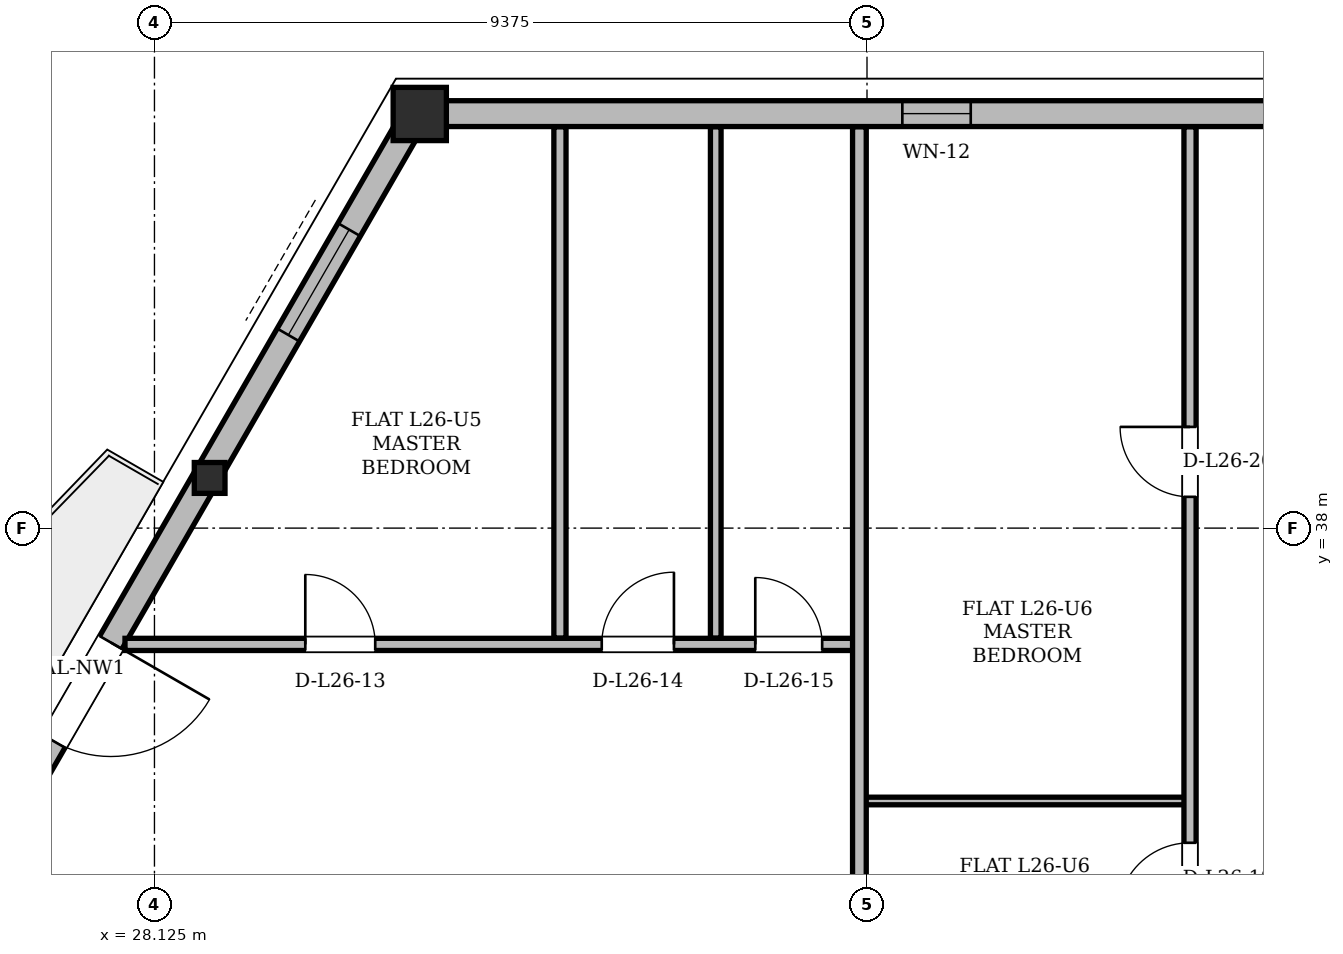
"""IFC4 building model, lengths in metres.
Left out: names, types, materials, properties, quantities, classifications, styles, units other than length and angle.
Written with IfcOpenShell. Run it as: python <this file> out.ifc"""

import sys

from ifc_helpers import new_model, si_unit, direction, frame, frame_2d, origin, origin_2d, place, context, subcontext, project, spatial, rectangle, hollow_rectangle, i_section, extrude, element, fill, save


model = new_model("IFC4")
c1 = context("Model", 3, precision=1e-05, world=origin(), true_north=direction((0.0, 1.0)))
c2 = subcontext(c1, "Body", "Model", "MODEL_VIEW")
j1 = project(units=[si_unit("LENGTHUNIT", "METRE"), si_unit("PLANEANGLEUNIT", "RADIAN")], contexts=[c1])
p1 = place(None, origin())
s1 = spatial("IfcSite", under=j1, at=p1, CompositionType="ELEMENT")
p2 = place(p1, origin())
s2 = spatial("IfcBuilding", under=s1, at=p2, CompositionType="ELEMENT")
p3 = place(p2, frame((0.0, 0.0, 100.5)))
s3 = spatial("IfcBuildingStorey", under=s2, at=p3, CompositionType="ELEMENT", Elevation=100.5)
p4 = place(p3, frame((31.568, 43.453, 0.004), z_axis=(0.026437061593, -0.002582540721, 0.999647143875), x_axis=(0.097223592457, 0.995262564889, 0.0)))
e1 = element("IfcColumn", 1, at=p4, inside=s3, PredefinedType="COLUMN", context=c2, shape_type="SweptSolid", body=[
    extrude(hollow_rectangle(XDim=0.7, YDim=0.7, WallThickness=0.055, at=origin_2d()), origin(), (0.0, 0.0, 1.0), 3.592),
])
p5 = place(p3, frame((28.807, 38.67, 0.004), z_axis=(0.024670863801, -0.005640996406, 0.999679712527), x_axis=(0.222897720207, 0.97484183657, 0.0)))
e2 = element("IfcColumn", 2, at=p5, inside=s3, PredefinedType="COLUMN", context=c2, shape_type="SweptSolid", body=[
    extrude(i_section(OverallWidth=0.404, OverallDepth=0.406, WebThickness=0.027, FlangeThickness=0.044, at=origin_2d()), origin(), (0.0, 0.0, 1.0), 3.592),
])
p6 = place(p3, frame((43.432, 43.453, 0.0), z_axis=(0.0, 0.0, 1.0), x_axis=(-1.0, 0.0, 0.0)))
e3 = element("IfcWall", 3, at=p6, inside=s3, PredefinedType="SOLIDWALL", context=c2, shape_type="SweptSolid", body=[
    extrude(rectangle(XDim=11.864, YDim=0.34, at=frame_2d((5.932, 0.0))), origin(), (0.0, 0.0, 1.0), 2.578),
])
p7 = place(p6, frame((4.567, 0.0, 0.85)))
e4 = element("IfcOpeningElement", 4, at=p7, cuts=e3, PredefinedType="OPENING", context=c2, shape_type="SweptSolid", body=[
    extrude(rectangle(XDim=0.9, YDim=1.15, at=frame_2d((0.45, 0.575))), frame((0.0, 0.17, 0.0), z_axis=(0.0, -1.0, 0.0), x_axis=(1.0, 0.0, 0.0)), (0.0, 0.0, 1.0), 0.34),
])
p8 = place(p3, frame((31.568, 43.453, 0.0), z_axis=(0.0, 0.0, 1.0), x_axis=(-0.500002056916, -0.86602421622, 0.0)))
e5 = element("IfcWall", 5, at=p8, inside=s3, PredefinedType="SOLIDWALL", context=c2, shape_type="SweptSolid", body=[
    extrude(rectangle(XDim=34.516, YDim=0.34, at=frame_2d((17.258, 0.0))), origin(), (0.0, 0.0, 1.0), 2.578),
])
p9 = place(p8, frame((8.034, 0.0, 0.0)))
e6 = element("IfcOpeningElement", 6, at=p9, cuts=e5, PredefinedType="OPENING", context=c2, shape_type="SweptSolid", body=[
    extrude(rectangle(XDim=1.5, YDim=2.2, at=frame_2d((0.75, 1.1))), frame((0.0, 0.17, 0.0), z_axis=(0.0, -1.0, 0.0), x_axis=(1.0, 0.0, 0.0)), (0.0, 0.0, 1.0), 0.34),
])
p10 = place(p8, frame((26.647, 0.0, 0.0)))
e7 = element("IfcOpeningElement", 7, at=p10, cuts=e5, PredefinedType="OPENING", context=c2, shape_type="SweptSolid", body=[
    extrude(rectangle(XDim=1.5, YDim=2.2, at=frame_2d((0.75, 1.1))), frame((0.0, 0.17, 0.0), z_axis=(0.0, -1.0, 0.0), x_axis=(1.0, 0.0, 0.0)), (0.0, 0.0, 1.0), 0.34),
])
p11 = place(p8, frame((31.672, 0.0, 0.85)))
e8 = element("IfcOpeningElement", 8, at=p11, cuts=e5, PredefinedType="OPENING", context=c2, shape_type="SweptSolid", body=[
    extrude(rectangle(XDim=1.6, YDim=1.618, at=frame_2d((0.8, 0.809))), frame((0.0, 0.17, 0.0), z_axis=(0.0, -1.0, 0.0), x_axis=(1.0, 0.0, 0.0)), (0.0, 0.0, 1.0), 0.34),
])
p12 = place(p8, frame((11.262, 0.0, 0.85)))
e9 = element("IfcOpeningElement", 9, at=p12, cuts=e5, PredefinedType="OPENING", context=c2, shape_type="SweptSolid", body=[
    extrude(rectangle(XDim=1.8, YDim=1.618, at=frame_2d((0.9, 0.809))), frame((0.0, 0.17, 0.0), z_axis=(0.0, -1.0, 0.0), x_axis=(1.0, 0.0, 0.0)), (0.0, 0.0, 1.0), 0.34),
])
p13 = place(p8, frame((18.602, 0.0, 0.85)))
e10 = element("IfcOpeningElement", 10, at=p13, cuts=e5, PredefinedType="OPENING", context=c2, shape_type="SweptSolid", body=[
    extrude(rectangle(XDim=1.2, YDim=1.48, at=frame_2d((0.6, 0.74))), frame((0.0, 0.17, 0.0), z_axis=(0.0, -1.0, 0.0), x_axis=(1.0, 0.0, 0.0)), (0.0, 0.0, 1.0), 0.34),
])
p14 = place(p8, frame((1.763, 0.0, 0.85)))
e11 = element("IfcOpeningElement", 11, at=p14, cuts=e5, PredefinedType="OPENING", context=c2, shape_type="SweptSolid", body=[
    extrude(rectangle(XDim=1.6, YDim=1.618, at=frame_2d((0.8, 0.809))), frame((0.0, 0.17, 0.0), z_axis=(0.0, -1.0, 0.0), x_axis=(1.0, 0.0, 0.0)), (0.0, 0.0, 1.0), 0.34),
])
p15 = place(p3, frame((37.35, 34.41, 0.0), z_axis=(0.0, 0.0, 1.0), x_axis=(1.0, 0.0, 0.0)))
e12 = element("IfcWall", 12, at=p15, inside=s3, PredefinedType="PARTITIONING", context=c2, shape_type="SweptSolid", body=[
    extrude(rectangle(XDim=4.4, YDim=0.1, at=frame_2d((2.2, 0.0))), origin(), (0.0, 0.0, 1.0), 3.36),
])
p16 = place(p3, frame((27.737, 36.47, 0.0), z_axis=(0.0, 0.0, 1.0), x_axis=(1.0, 0.0, 0.0)))
e13 = element("IfcWall", 13, at=p16, inside=s3, PredefinedType="PARTITIONING", context=c2, shape_type="SweptSolid", body=[
    extrude(rectangle(XDim=9.713, YDim=0.16, at=frame_2d((4.856, 0.0))), origin(), (0.0, 0.0, 1.0), 2.814),
])
p17 = place(p16, frame((2.372, 0.0, 0.0)))
e14 = element("IfcOpeningElement", 14, at=p17, cuts=e13, PredefinedType="OPENING", context=c2, shape_type="SweptSolid", body=[
    extrude(rectangle(XDim=0.92, YDim=2.12, at=frame_2d((0.46, 1.06))), frame((0.0, 0.08, 0.0), z_axis=(0.0, -1.0, 0.0), x_axis=(1.0, 0.0, 0.0)), (0.0, 0.0, 1.0), 0.16),
])
p18 = place(p16, frame((6.273, 0.0, 0.0)))
e15 = element("IfcOpeningElement", 15, at=p18, cuts=e13, PredefinedType="OPENING", context=c2, shape_type="SweptSolid", body=[
    extrude(rectangle(XDim=0.95, YDim=2.1, at=frame_2d((0.475, 1.05))), frame((0.0, 0.08, 0.0), z_axis=(0.0, -1.0, 0.0), x_axis=(1.0, 0.0, 0.0)), (0.0, 0.0, 1.0), 0.16),
])
p19 = place(p16, frame((8.292, 0.0, 0.0)))
e16 = element("IfcOpeningElement", 16, at=p19, cuts=e13, PredefinedType="OPENING", context=c2, shape_type="SweptSolid", body=[
    extrude(rectangle(XDim=0.88, YDim=2.08, at=frame_2d((0.44, 1.04))), frame((0.0, 0.08, 0.0), z_axis=(0.0, -1.0, 0.0), x_axis=(1.0, 0.0, 0.0)), (0.0, 0.0, 1.0), 0.16),
])
p20 = place(p3, frame((33.46, 36.554, 0.0), z_axis=(0.0, 0.0, 1.0), x_axis=(0.0, 1.0, 0.0)))
e17 = element("IfcWall", 17, at=p20, inside=s3, PredefinedType="PARTITIONING", context=c2, shape_type="SweptSolid", body=[
    extrude(rectangle(XDim=6.725, YDim=0.16, at=frame_2d((3.363, 0.0))), origin(), (0.0, 0.0, 1.0), 3.36),
])
p21 = place(p3, frame((35.51, 36.554, 0.0), z_axis=(0.0, 0.0, 1.0), x_axis=(0.0, 1.0, 0.0)))
e18 = element("IfcWall", 18, at=p21, inside=s3, PredefinedType="PARTITIONING", context=c2, shape_type="SweptSolid", body=[
    extrude(rectangle(XDim=6.725, YDim=0.14, at=frame_2d((3.363, 0.0))), origin(), (0.0, 0.0, 1.0), 3.36),
])
p22 = place(p3, frame((37.4, 26.064, 0.0), z_axis=(0.0, 0.0, 1.0), x_axis=(0.0, 1.0, 0.0)))
e19 = element("IfcWall", 19, at=p22, inside=s3, PredefinedType="PARTITIONING", context=c2, shape_type="SweptSolid", body=[
    extrude(rectangle(XDim=17.215, YDim=0.18, at=frame_2d((8.607, 0.0))), origin(), (0.0, 0.0, 1.0), 3.36),
])
p23 = place(p3, frame((41.75, 30.564, 0.0), z_axis=(0.0, 0.0, 1.0), x_axis=(0.0, 1.0, 0.0)))
e20 = element("IfcWall", 20, at=p23, inside=s3, PredefinedType="PARTITIONING", context=c2, shape_type="SweptSolid", body=[
    extrude(rectangle(XDim=12.715, YDim=0.16, at=frame_2d((6.357, 0.0))), origin(), (0.0, 0.0, 1.0), 3.36),
])
p24 = place(p23, frame((0.396, 0.0, 0.0)))
e21 = element("IfcOpeningElement", 21, at=p24, cuts=e20, PredefinedType="OPENING", context=c2, shape_type="SweptSolid", body=[
    extrude(rectangle(XDim=0.88, YDim=2.08, at=frame_2d((0.44, 1.04))), frame((0.0, 0.08, 0.0), z_axis=(0.0, -1.0, 0.0), x_axis=(1.0, 0.0, 0.0)), (0.0, 0.0, 1.0), 0.16),
])
p25 = place(p23, frame((2.346, 0.0, 0.0)))
e22 = element("IfcOpeningElement", 22, at=p25, cuts=e20, PredefinedType="OPENING", context=c2, shape_type="SweptSolid", body=[
    extrude(rectangle(XDim=0.95, YDim=2.1, at=frame_2d((0.475, 1.05))), frame((0.0, 0.08, 0.0), z_axis=(0.0, -1.0, 0.0), x_axis=(1.0, 0.0, 0.0)), (0.0, 0.0, 1.0), 0.16),
])
p26 = place(p23, frame((7.847, 0.0, 0.0)))
e23 = element("IfcOpeningElement", 23, at=p26, cuts=e20, PredefinedType="OPENING", context=c2, shape_type="SweptSolid", body=[
    extrude(rectangle(XDim=0.92, YDim=2.12, at=frame_2d((0.46, 1.06))), frame((0.0, 0.08, 0.0), z_axis=(0.0, -1.0, 0.0), x_axis=(1.0, 0.0, 0.0)), (0.0, 0.0, 1.0), 0.16),
])
p27 = place(p9, origin())
e24 = element("IfcDoor", 24, at=p27, inside=s3, OperationType="SINGLE_SWING_LEFT", PredefinedType="DOOR", context=c2, shape_type="SweptSolid", body=[
    extrude(rectangle(XDim=1.5, YDim=2.2, at=frame_2d((0.75, 1.1))), frame((0.0, 0.025, 0.0), z_axis=(0.0, -1.0, 0.0), x_axis=(1.0, 0.0, 0.0)), (0.0, 0.0, 1.0), 0.05),
])
fill(e6, e24)
p28 = place(p14, origin())
e25 = element("IfcWindow", 25, at=p28, inside=s3, PartitioningType="SINGLE_PANEL", PredefinedType="WINDOW", context=c2, shape_type="SweptSolid", body=[
    extrude(rectangle(XDim=1.6, YDim=1.618, at=frame_2d((0.8, 0.809))), frame((0.0, 0.03, 0.0), z_axis=(0.0, -1.0, 0.0), x_axis=(1.0, 0.0, 0.0)), (0.0, 0.0, 1.0), 0.06),
])
fill(e11, e25)
p29 = place(p7, origin())
e26 = element("IfcWindow", 26, at=p29, inside=s3, PartitioningType="SINGLE_PANEL", PredefinedType="WINDOW", context=c2, shape_type="SweptSolid", body=[
    extrude(rectangle(XDim=0.9, YDim=1.15, at=frame_2d((0.45, 0.575))), frame((0.0, 0.03, 0.0), z_axis=(0.0, -1.0, 0.0), x_axis=(1.0, 0.0, 0.0)), (0.0, 0.0, 1.0), 0.06),
])
fill(e4, e26)
p30 = place(p17, origin())
e27 = element("IfcDoor", 27, at=p30, inside=s3, OperationType="SINGLE_SWING_LEFT", PredefinedType="DOOR", context=c2, shape_type="SweptSolid", body=[
    extrude(rectangle(XDim=0.92, YDim=2.12, at=frame_2d((0.46, 1.06))), frame((0.0, 0.025, 0.0), z_axis=(0.0, -1.0, 0.0), x_axis=(1.0, 0.0, 0.0)), (0.0, 0.0, 1.0), 0.05),
])
fill(e14, e27)
p31 = place(p18, origin())
e28 = element("IfcDoor", 28, at=p31, inside=s3, OperationType="SINGLE_SWING_RIGHT", PredefinedType="DOOR", context=c2, shape_type="SweptSolid", body=[
    extrude(rectangle(XDim=0.95, YDim=2.1, at=frame_2d((0.475, 1.05))), frame((0.0, 0.025, 0.0), z_axis=(0.0, -1.0, 0.0), x_axis=(1.0, 0.0, 0.0)), (0.0, 0.0, 1.0), 0.05),
])
fill(e15, e28)
p32 = place(p19, origin())
e29 = element("IfcDoor", 29, at=p32, inside=s3, OperationType="SINGLE_SWING_LEFT", PredefinedType="DOOR", context=c2, shape_type="SweptSolid", body=[
    extrude(rectangle(XDim=0.88, YDim=2.08, at=frame_2d((0.44, 1.04))), frame((0.0, 0.025, 0.0), z_axis=(0.0, -1.0, 0.0), x_axis=(1.0, 0.0, 0.0)), (0.0, 0.0, 1.0), 0.05),
])
fill(e16, e29)
p33 = place(p25, origin())
e30 = element("IfcDoor", 30, at=p33, inside=s3, OperationType="SINGLE_SWING_LEFT", PredefinedType="DOOR", context=c2, shape_type="SweptSolid", body=[
    extrude(rectangle(XDim=0.95, YDim=2.1, at=frame_2d((0.475, 1.05))), frame((0.0, 0.025, 0.0), z_axis=(0.0, -1.0, 0.0), x_axis=(1.0, 0.0, 0.0)), (0.0, 0.0, 1.0), 0.05),
])
fill(e22, e30)
p34 = place(p26, origin())
e31 = element("IfcDoor", 31, at=p34, inside=s3, OperationType="SINGLE_SWING_RIGHT", PredefinedType="DOOR", context=c2, shape_type="SweptSolid", body=[
    extrude(rectangle(XDim=0.92, YDim=2.12, at=frame_2d((0.46, 1.06))), frame((0.0, 0.025, 0.0), z_axis=(0.0, -1.0, 0.0), x_axis=(1.0, 0.0, 0.0)), (0.0, 0.0, 1.0), 0.05),
])
fill(e23, e31)
save(model, sys.argv[1])
